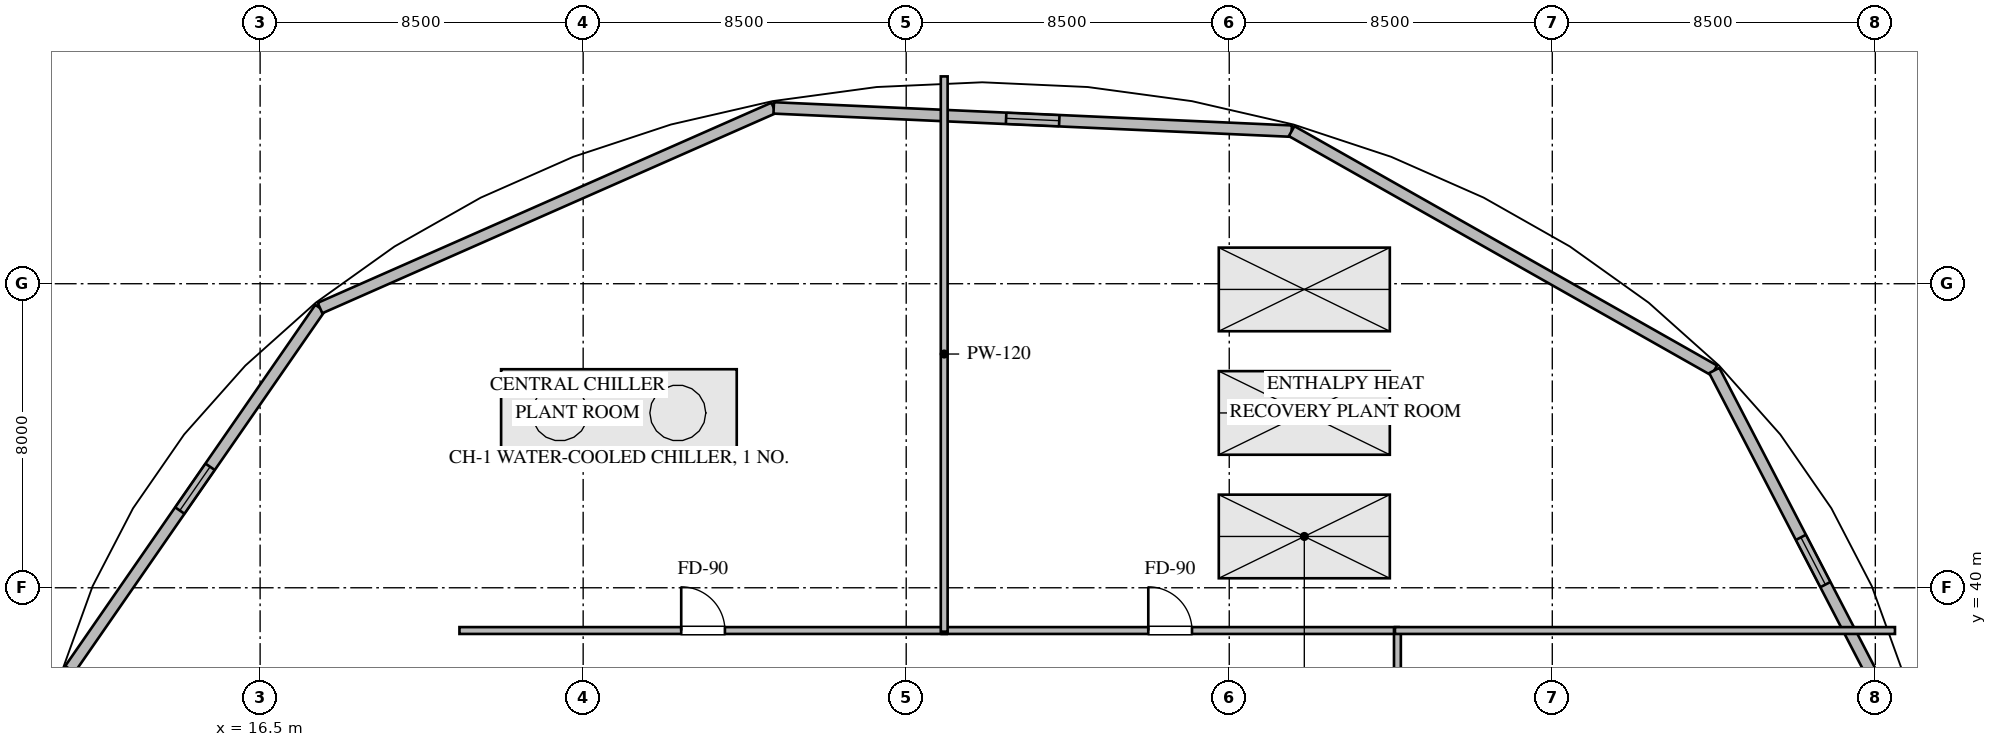
"""IFC4 building model, lengths in metres.
Left out: names, types, materials, properties, quantities, classifications, styles, units other than length and angle.
Written with IfcOpenShell. Run it as: python <this file> out.ifc"""

import sys

from ifc_helpers import new_model, si_unit, direction, frame, frame_2d, origin, place, context, subcontext, project, spatial, rectangle, extrude, element, fill, save


model = new_model("IFC4")
c1 = context("Model", 3, precision=1e-05, world=origin(), true_north=direction((0.0, 1.0)))
c2 = subcontext(c1, "Body", "Model", "MODEL_VIEW")
j1 = project(units=[si_unit("LENGTHUNIT", "METRE"), si_unit("PLANEANGLEUNIT", "RADIAN")], contexts=[c1])
p1 = place(None, origin())
s1 = spatial("IfcSite", under=j1, at=p1, CompositionType="ELEMENT")
p2 = place(p1, origin())
s2 = spatial("IfcBuilding", under=s1, at=p2, CompositionType="ELEMENT")
p3 = place(p2, frame((0.0, 0.0, 292.8)))
s3 = spatial("IfcBuildingStorey", under=s2, at=p3, CompositionType="ELEMENT", Elevation=292.8)
p4 = place(p3, frame((11.495, 37.856, 0.0), z_axis=(0.0, 0.0, 1.0), x_axis=(0.569269280193, 0.822151133691, 0.0)))
e1 = element("IfcWall", 1, at=p4, inside=s3, PredefinedType="STANDARD", context=c2, shape_type="SweptSolid", body=[
    extrude(rectangle(XDim=11.56, YDim=0.3, at=frame_2d((5.78, 0.0))), origin(), (0.0, 0.0, 1.0), 3.72),
])
p5 = place(p4, frame((5.08, 0.0, 1.2)))
e2 = element("IfcOpeningElement", 2, at=p5, cuts=e1, PredefinedType="OPENING", context=c2, shape_type="SweptSolid", body=[
    extrude(rectangle(XDim=1.4, YDim=1.2, at=frame_2d((0.7, 0.6))), frame((0.0, 0.16, 0.0), z_axis=(0.0, -1.0, 0.0), x_axis=(1.0, 0.0, 0.0)), (0.0, 0.0, 1.0), 0.32),
])
p6 = place(p3, frame((18.076, 47.36, 0.0), z_axis=(0.0, 0.0, 1.0), x_axis=(0.914943001047, 0.40358308294, 0.0)))
e3 = element("IfcWall", 3, at=p6, inside=s3, PredefinedType="STANDARD", context=c2, shape_type="SweptSolid", body=[
    extrude(rectangle(XDim=13.048, YDim=0.3, at=frame_2d((6.524, 0.0))), origin(), (0.0, 0.0, 1.0), 3.72),
])
p7 = place(p3, frame((30.014, 52.626, 0.0), z_axis=(0.0, 0.0, 1.0), x_axis=(0.998996211569, -0.04479474602, 0.0)))
e4 = element("IfcWall", 4, at=p7, inside=s3, PredefinedType="STANDARD", context=c2, shape_type="SweptSolid", body=[
    extrude(rectangle(XDim=13.642, YDim=0.3, at=frame_2d((6.821, 0.0))), origin(), (0.0, 0.0, 1.0), 3.72),
])
p8 = place(p7, frame((6.121, 0.0, 1.2)))
e5 = element("IfcOpeningElement", 5, at=p8, cuts=e4, PredefinedType="OPENING", context=c2, shape_type="SweptSolid", body=[
    extrude(rectangle(XDim=1.4, YDim=1.2, at=frame_2d((0.7, 0.6))), frame((0.0, 0.16, 0.0), z_axis=(0.0, -1.0, 0.0), x_axis=(1.0, 0.0, 0.0)), (0.0, 0.0, 1.0), 0.32),
])
p9 = place(p3, frame((43.642, 52.015, 0.0), z_axis=(0.0, 0.0, 1.0), x_axis=(0.870169378253, -0.492752730232, 0.0)))
e6 = element("IfcWall", 6, at=p9, inside=s3, PredefinedType="STANDARD", context=c2, shape_type="SweptSolid", body=[
    extrude(rectangle(XDim=12.779, YDim=0.3, at=frame_2d((6.39, 0.0))), origin(), (0.0, 0.0, 1.0), 3.72),
])
p10 = place(p3, frame((54.762, 45.718, 0.0), z_axis=(0.0, 0.0, 1.0), x_axis=(0.460623742834, -0.8875954977, 0.0)))
e7 = element("IfcWall", 7, at=p10, inside=s3, PredefinedType="STANDARD", context=c2, shape_type="SweptSolid", body=[
    extrude(rectangle(XDim=11.296, YDim=0.3, at=frame_2d((5.648, 0.0))), origin(), (0.0, 0.0, 1.0), 3.72),
])
p11 = place(p10, frame((4.948, 0.0, 1.2)))
e8 = element("IfcOpeningElement", 8, at=p11, cuts=e7, PredefinedType="OPENING", context=c2, shape_type="SweptSolid", body=[
    extrude(rectangle(XDim=1.4, YDim=1.2, at=frame_2d((0.7, 0.6))), frame((0.0, 0.16, 0.0), z_axis=(0.0, -1.0, 0.0), x_axis=(1.0, 0.0, 0.0)), (0.0, 0.0, 1.0), 0.32),
])
p12 = place(p3, frame((21.745, 38.875, 0.0), z_axis=(0.0, 0.0, 1.0), x_axis=(1.0, 0.0, 0.0)))
e9 = element("IfcWall", 9, at=p12, inside=s3, PredefinedType="PARTITIONING", context=c2, shape_type="SweptSolid", body=[
    extrude(rectangle(XDim=12.82, YDim=0.18, at=frame_2d((6.41, 0.0))), origin(), (0.0, 0.0, 1.0), 3.72),
])
p13 = place(p12, frame((5.835, 0.0, 0.0)))
e10 = element("IfcOpeningElement", 10, at=p13, cuts=e9, PredefinedType="OPENING", context=c2, shape_type="SweptSolid", body=[
    extrude(rectangle(XDim=1.15, YDim=2.1, at=frame_2d((0.575, 1.05))), frame((0.0, 0.1, 0.0), z_axis=(0.0, -1.0, 0.0), x_axis=(1.0, 0.0, 0.0)), (0.0, 0.0, 1.0), 0.2),
])
p14 = place(p3, frame((34.435, 38.875, 0.0), z_axis=(0.0, 0.0, 1.0), x_axis=(1.0, 0.0, 0.0)))
e11 = element("IfcWall", 11, at=p14, inside=s3, PredefinedType="PARTITIONING", context=c2, shape_type="SweptSolid", body=[
    extrude(rectangle(XDim=12.02, YDim=0.18, at=frame_2d((6.01, 0.0))), origin(), (0.0, 0.0, 1.0), 3.72),
])
p15 = place(p14, frame((5.435, 0.0, 0.0)))
e12 = element("IfcOpeningElement", 12, at=p15, cuts=e11, PredefinedType="OPENING", context=c2, shape_type="SweptSolid", body=[
    extrude(rectangle(XDim=1.15, YDim=2.1, at=frame_2d((0.575, 1.05))), frame((0.0, 0.1, 0.0), z_axis=(0.0, -1.0, 0.0), x_axis=(1.0, 0.0, 0.0)), (0.0, 0.0, 1.0), 0.2),
])
p16 = place(p3, frame((46.425, 38.905, 0.0), z_axis=(0.0, 0.0, 1.0), x_axis=(0.0, -1.0, 0.0)))
e13 = element("IfcWall", 13, at=p16, inside=s3, PredefinedType="PARTITIONING", context=c2, shape_type="SweptSolid", body=[
    extrude(rectangle(XDim=15.56, YDim=0.18, at=frame_2d((7.78, 0.0))), origin(), (0.0, 0.0, 1.0), 3.72),
])
p17 = place(p16, frame((7.205, 0.0, 0.0)))
e14 = element("IfcOpeningElement", 14, at=p17, cuts=e13, PredefinedType="OPENING", context=c2, shape_type="SweptSolid", body=[
    extrude(rectangle(XDim=1.15, YDim=2.1, at=frame_2d((0.575, 1.05))), frame((0.0, 0.1, 0.0), z_axis=(0.0, -1.0, 0.0), x_axis=(1.0, 0.0, 0.0)), (0.0, 0.0, 1.0), 0.2),
])
p18 = place(p3, frame((34.5, 53.455, 0.0), z_axis=(0.0, 0.0, 1.0), x_axis=(0.0, -1.0, 0.0)))
e15 = element("IfcWall", 15, at=p18, inside=s3, PredefinedType="PARTITIONING", context=c2, shape_type="SweptSolid", body=[
    extrude(rectangle(XDim=14.61, YDim=0.18, at=frame_2d((7.305, 0.0))), origin(), (0.0, 0.0, 1.0), 3.72),
])
p19 = place(p3, frame((59.517, 38.875, 0.0), z_axis=(0.0, 0.0, 1.0), x_axis=(-1.0, 0.0, 0.0)))
e16 = element("IfcWall", 16, at=p19, inside=s3, PredefinedType="PARTITIONING", context=c2, shape_type="SweptSolid", body=[
    extrude(rectangle(XDim=13.157, YDim=0.18, at=frame_2d((6.579, 0.0))), origin(), (0.0, 0.0, 1.0), 3.72),
])
p20 = place(p5, origin())
e17 = element("IfcWindow", 17, at=p20, inside=s3, PartitioningType="SINGLE_PANEL", PredefinedType="WINDOW", context=c2, shape_type="SweptSolid", body=[
    extrude(rectangle(XDim=1.4, YDim=1.2, at=frame_2d((0.7, 0.6))), frame((0.0, 0.03, 0.0), z_axis=(0.0, -1.0, 0.0), x_axis=(1.0, 0.0, 0.0)), (0.0, 0.0, 1.0), 0.06),
])
fill(e2, e17)
p21 = place(p8, origin())
e18 = element("IfcWindow", 18, at=p21, inside=s3, PartitioningType="SINGLE_PANEL", PredefinedType="WINDOW", context=c2, shape_type="SweptSolid", body=[
    extrude(rectangle(XDim=1.4, YDim=1.2, at=frame_2d((0.7, 0.6))), frame((0.0, 0.03, 0.0), z_axis=(0.0, -1.0, 0.0), x_axis=(1.0, 0.0, 0.0)), (0.0, 0.0, 1.0), 0.06),
])
fill(e5, e18)
p22 = place(p11, origin())
e19 = element("IfcWindow", 19, at=p22, inside=s3, PartitioningType="SINGLE_PANEL", PredefinedType="WINDOW", context=c2, shape_type="SweptSolid", body=[
    extrude(rectangle(XDim=1.4, YDim=1.2, at=frame_2d((0.7, 0.6))), frame((0.0, 0.03, 0.0), z_axis=(0.0, -1.0, 0.0), x_axis=(1.0, 0.0, 0.0)), (0.0, 0.0, 1.0), 0.06),
])
fill(e8, e19)
p23 = place(p13, origin())
e20 = element("IfcDoor", 20, at=p23, inside=s3, OperationType="SINGLE_SWING_LEFT", PredefinedType="DOOR", context=c2, shape_type="SweptSolid", body=[
    extrude(rectangle(XDim=1.15, YDim=2.1, at=frame_2d((0.575, 1.05))), frame((0.0, 0.025, 0.0), z_axis=(0.0, -1.0, 0.0), x_axis=(1.0, 0.0, 0.0)), (0.0, 0.0, 1.0), 0.05),
])
fill(e10, e20)
p24 = place(p15, origin())
e21 = element("IfcDoor", 21, at=p24, inside=s3, OperationType="SINGLE_SWING_LEFT", PredefinedType="DOOR", context=c2, shape_type="SweptSolid", body=[
    extrude(rectangle(XDim=1.15, YDim=2.1, at=frame_2d((0.575, 1.05))), frame((0.0, 0.025, 0.0), z_axis=(0.0, -1.0, 0.0), x_axis=(1.0, 0.0, 0.0)), (0.0, 0.0, 1.0), 0.05),
])
fill(e12, e21)
save(model, sys.argv[1])
